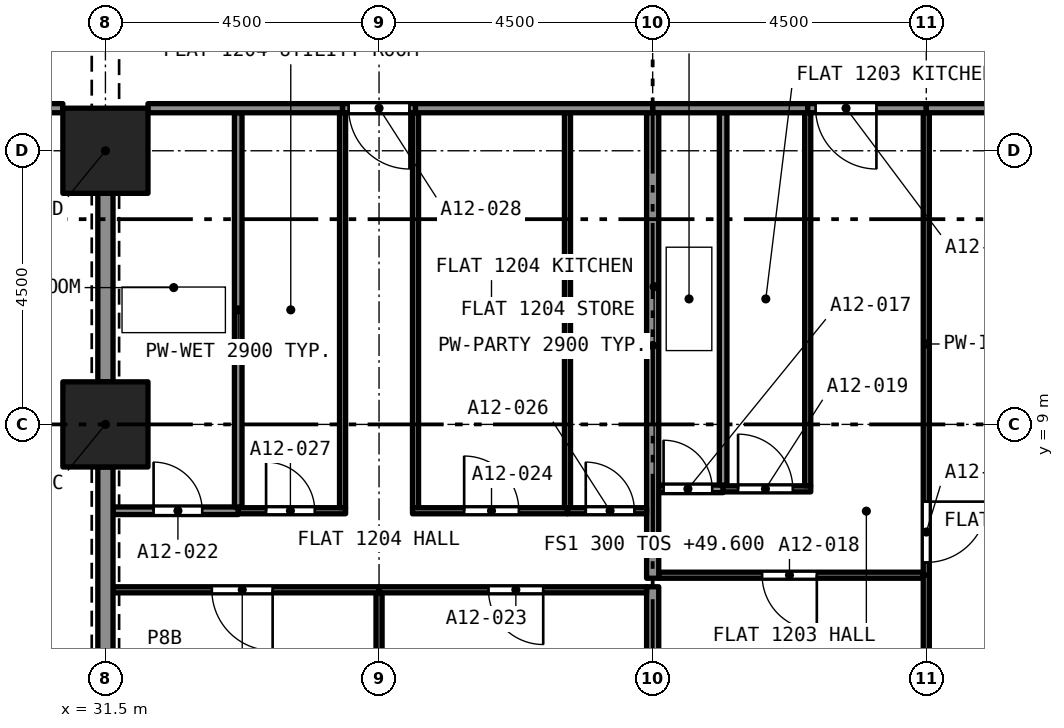
"""IFC4 building model, lengths in metres.
Left out: names, types, materials, properties, quantities, classifications, styles, units other than length and angle.
Written with IfcOpenShell. Run it as: python <this file> out.ifc"""

import sys

from ifc_helpers import new_model, si_unit, direction, frame, frame_2d, origin, origin_2d, place, context, subcontext, project, spatial, rectangle, extrude, element, fill, save


model = new_model("IFC4")
c1 = context("Model", 3, precision=1e-05, world=origin(), true_north=direction((0.0, 1.0)))
c2 = subcontext(c1, "Body", "Model", "MODEL_VIEW")
j1 = project(units=[si_unit("LENGTHUNIT", "METRE"), si_unit("PLANEANGLEUNIT", "RADIAN")], contexts=[c1])
p1 = place(None, origin())
s1 = spatial("IfcSite", under=j1, at=p1, CompositionType="ELEMENT")
p2 = place(p1, origin())
s2 = spatial("IfcBuilding", under=s1, at=p2, CompositionType="ELEMENT")
p3 = place(p2, frame((0.0, 0.0, 49.6)))
s3 = spatial("IfcBuildingStorey", under=s2, at=p3, CompositionType="ELEMENT", Elevation=49.6)
for number, where, z_axis, x_axis in (
    (1, (31.5, 9.0, 0.0), (0.0, 0.0, 1.0), (1.0, 0.0, 0.0)),
    (2, (31.5, 13.5, 0.0), (0.0, 0.0, 1.0), (1.0, 0.0, 0.0)),
):
    element("IfcColumn", number, at=place(p3, frame(where, z_axis=z_axis, x_axis=x_axis)), inside=s3, PredefinedType="COLUMN", context=c2, shape_type="SweptSolid", body=[
        extrude(rectangle(XDim=1.4, YDim=1.4, at=origin_2d()), origin(), (0.0, 0.0, 1.0), 3.2),
    ])
p4 = place(p3, frame((40.6, 7.94, 0.0), z_axis=(0.0, 0.0, 1.0), x_axis=(1.0, 0.0, 0.0)))
e3 = element("IfcWall", 3, at=p4, inside=s3, PredefinedType="PARTITIONING", context=c2, shape_type="SweptSolid", body=[
    extrude(rectangle(XDim=1.059, YDim=0.125, at=frame_2d((0.53, 0.0))), origin(), (0.0, 0.0, 1.0), 2.9),
])
p5 = place(p4, frame((0.08, 0.0, 0.0)))
e4 = element("IfcOpeningElement", 4, at=p5, cuts=e3, PredefinedType="OPENING", context=c2, shape_type="SweptSolid", body=[
    extrude(rectangle(XDim=0.8, YDim=2.1, at=frame_2d((0.4, 1.05))), frame((0.0, 0.073, 0.0), z_axis=(0.0, -1.0, 0.0), x_axis=(1.0, 0.0, 0.0)), (0.0, 0.0, 1.0), 0.145),
])
p6 = place(p3, frame((41.659, 8.002, 0.0), z_axis=(0.0, 0.0, 1.0), x_axis=(0.0, 1.0, 0.0)))
e5 = element("IfcWall", 5, at=p6, inside=s3, PredefinedType="PARTITIONING", context=c2, shape_type="SweptSolid", body=[
    extrude(rectangle(XDim=6.123, YDim=0.125, at=frame_2d((3.061, 0.0))), origin(), (0.0, 0.0, 1.0), 2.9),
])
p7 = place(p3, frame((40.5, 14.2, 0.0), z_axis=(0.0, 0.0, 1.0), x_axis=(1.0, 0.0, 0.0)))
e6 = element("IfcWall", 6, at=p7, inside=s3, PredefinedType="PARTITIONING", context=c2, shape_type="SweptSolid", body=[
    extrude(rectangle(XDim=2.55, YDim=0.15, at=frame_2d((1.275, 0.0))), origin(), (0.0, 0.0, 1.0), 2.9),
])
p8 = place(p3, frame((44.95, 6.52, 0.0), z_axis=(0.0, 0.0, 1.0), x_axis=(-1.0, 0.0, 0.0)))
e7 = element("IfcWall", 7, at=p8, inside=s3, PredefinedType="PARTITIONING", context=c2, shape_type="SweptSolid", body=[
    extrude(rectangle(XDim=4.35, YDim=0.1, at=frame_2d((2.175, 0.0))), origin(), (0.0, 0.0, 1.0), 2.9),
])
p9 = place(p8, frame((1.75, 0.0, 0.0)))
e8 = element("IfcOpeningElement", 8, at=p9, cuts=e7, PredefinedType="OPENING", context=c2, shape_type="SweptSolid", body=[
    extrude(rectangle(XDim=0.9, YDim=2.1, at=frame_2d((0.45, 1.05))), frame((0.0, 0.06, 0.0), z_axis=(0.0, -1.0, 0.0), x_axis=(1.0, 0.0, 0.0)), (0.0, 0.0, 1.0), 0.12),
])
p10 = place(p3, frame((45.0, 0.758, 0.0), z_axis=(0.0, 0.0, 1.0), x_axis=(0.0, 1.0, 0.0)))
e9 = element("IfcWall", 9, at=p10, inside=s3, PredefinedType="PARTITIONING", context=c2, shape_type="SweptSolid", body=[
    extrude(rectangle(XDim=5.762, YDim=0.1, at=frame_2d((2.881, 0.0))), origin(), (0.0, 0.0, 1.0), 2.9),
])
p11 = place(p3, frame((40.5, 0.7, 0.0), z_axis=(0.0, 0.0, 1.0), x_axis=(0.0, 1.0, 0.0)))
e10 = element("IfcWall", 10, at=p11, inside=s3, PredefinedType="PARTITIONING", context=c2, shape_type="SweptSolid", body=[
    extrude(rectangle(XDim=5.63, YDim=0.2, at=frame_2d((2.815, 0.0))), origin(), (0.0, 0.0, 1.0), 2.9),
])
p12 = place(p3, frame((41.659, 7.94, 0.0), z_axis=(0.0, 0.0, 1.0), x_axis=(1.0, 0.0, 0.0)))
e11 = element("IfcWall", 11, at=p12, inside=s3, PredefinedType="PARTITIONING", context=c2, shape_type="SweptSolid", body=[
    extrude(rectangle(XDim=1.441, YDim=0.1, at=frame_2d((0.72, 0.0))), origin(), (0.0, 0.0, 1.0), 2.9),
])
p13 = place(p12, frame((0.246, 0.0, 0.0)))
e12 = element("IfcOpeningElement", 12, at=p13, cuts=e11, PredefinedType="OPENING", context=c2, shape_type="SweptSolid", body=[
    extrude(rectangle(XDim=0.9, YDim=2.1, at=frame_2d((0.45, 1.05))), frame((0.0, 0.06, 0.0), z_axis=(0.0, -1.0, 0.0), x_axis=(1.0, 0.0, 0.0)), (0.0, 0.0, 1.0), 0.12),
])
p14 = place(p3, frame((43.05, 7.99, 0.0), z_axis=(0.0, 0.0, 1.0), x_axis=(0.0, 1.0, 0.0)))
e13 = element("IfcWall", 13, at=p14, inside=s3, PredefinedType="PARTITIONING", context=c2, shape_type="SweptSolid", body=[
    extrude(rectangle(XDim=6.135, YDim=0.1, at=frame_2d((3.067, 0.0))), origin(), (0.0, 0.0, 1.0), 2.9),
])
p15 = place(p3, frame((45.0, 14.125, 0.0), z_axis=(0.0, 0.0, 1.0), x_axis=(0.0, -1.0, 0.0)))
e14 = element("IfcWall", 14, at=p15, inside=s3, PredefinedType="PARTITIONING", context=c2, shape_type="SweptSolid", body=[
    extrude(rectangle(XDim=7.605, YDim=0.1, at=frame_2d((3.802, 0.0))), origin(), (0.0, 0.0, 1.0), 2.9),
])
p16 = place(p15, frame((6.395, 0.0, 0.0)))
e15 = element("IfcOpeningElement", 15, at=p16, cuts=e14, PredefinedType="OPENING", context=c2, shape_type="SweptSolid", body=[
    extrude(rectangle(XDim=1.0, YDim=2.1, at=frame_2d((0.5, 1.05))), frame((0.0, 0.06, 0.0), z_axis=(0.0, -1.0, 0.0), x_axis=(1.0, 0.0, 0.0)), (0.0, 0.0, 1.0), 0.12),
])
p17 = place(p3, frame((40.5, 6.47, 0.0), z_axis=(0.0, 0.0, 1.0), x_axis=(0.0, 1.0, 0.0)))
e16 = element("IfcWall", 16, at=p17, inside=s3, PredefinedType="PARTITIONING", context=c2, shape_type="SweptSolid", body=[
    extrude(rectangle(XDim=7.655, YDim=0.2, at=frame_2d((3.828, 0.0))), origin(), (0.0, 0.0, 1.0), 2.9),
])
p18 = place(p3, frame((45.0, 14.2, 0.0), z_axis=(0.0, 0.0, 1.0), x_axis=(-1.0, 0.0, 0.0)))
e17 = element("IfcWall", 17, at=p18, inside=s3, PredefinedType="PARTITIONING", context=c2, shape_type="SweptSolid", body=[
    extrude(rectangle(XDim=1.95, YDim=0.15, at=frame_2d((0.975, 0.0))), origin(), (0.0, 0.0, 1.0), 2.9),
])
p19 = place(p18, frame((0.82, 0.0, 0.0)))
e18 = element("IfcOpeningElement", 18, at=p19, cuts=e17, PredefinedType="OPENING", context=c2, shape_type="SweptSolid", body=[
    extrude(rectangle(XDim=1.0, YDim=2.1, at=frame_2d((0.5, 1.05))), frame((0.0, 0.085, 0.0), z_axis=(0.0, -1.0, 0.0), x_axis=(1.0, 0.0, 0.0)), (0.0, 0.0, 1.0), 0.17),
])
p20 = place(p3, frame((45.0, 14.2, 0.0), z_axis=(0.0, 0.0, 1.0), x_axis=(1.0, 0.0, 0.0)))
e19 = element("IfcWall", 19, at=p20, inside=s3, PredefinedType="PARTITIONING", context=c2, shape_type="SweptSolid", body=[
    extrude(rectangle(XDim=3.8, YDim=0.15, at=frame_2d((1.9, 0.0))), origin(), (0.0, 0.0, 1.0), 2.9),
])
p21 = place(p3, frame((31.625, 7.58, 0.0), z_axis=(0.0, 0.0, 1.0), x_axis=(1.0, 0.0, 0.0)))
e20 = element("IfcWall", 20, at=p21, inside=s3, PredefinedType="PARTITIONING", context=c2, shape_type="SweptSolid", body=[
    extrude(rectangle(XDim=2.059, YDim=0.125, at=frame_2d((1.03, 0.0))), origin(), (0.0, 0.0, 1.0), 2.9),
])
p22 = place(p21, frame((0.667, 0.0, 0.0)))
e21 = element("IfcOpeningElement", 21, at=p22, cuts=e20, PredefinedType="OPENING", context=c2, shape_type="SweptSolid", body=[
    extrude(rectangle(XDim=0.8, YDim=2.1, at=frame_2d((0.4, 1.05))), frame((0.0, 0.073, 0.0), z_axis=(0.0, -1.0, 0.0), x_axis=(1.0, 0.0, 0.0)), (0.0, 0.0, 1.0), 0.145),
])
p23 = place(p3, frame((33.684, 7.643, 0.0), z_axis=(0.0, 0.0, 1.0), x_axis=(0.0, 1.0, 0.0)))
e22 = element("IfcWall", 22, at=p23, inside=s3, PredefinedType="PARTITIONING", context=c2, shape_type="SweptSolid", body=[
    extrude(rectangle(XDim=6.482, YDim=0.125, at=frame_2d((3.241, 0.0))), origin(), (0.0, 0.0, 1.0), 2.9),
])
p24 = place(p3, frame((31.5, 9.7, 0.0), z_axis=(0.0, 0.0, 1.0), x_axis=(0.0, 1.0, 0.0)))
e23 = element("IfcWall", 23, at=p24, inside=s3, PredefinedType="PARTITIONING", context=c2, shape_type="SweptSolid", body=[
    extrude(rectangle(XDim=3.1, YDim=0.25, at=frame_2d((1.55, 0.0))), origin(), (0.0, 0.0, 1.0), 2.38),
])
p25 = place(p3, frame((32.2, 14.2, 0.0), z_axis=(0.0, 0.0, 1.0), x_axis=(1.0, 0.0, 0.0)))
e24 = element("IfcWall", 24, at=p25, inside=s3, PredefinedType="PARTITIONING", context=c2, shape_type="SweptSolid", body=[
    extrude(rectangle(XDim=3.2, YDim=0.15, at=frame_2d((1.6, 0.0))), origin(), (0.0, 0.0, 1.0), 2.9),
])
p26 = place(p3, frame((40.4, 6.28, 0.0), z_axis=(0.0, 0.0, 1.0), x_axis=(-1.0, 0.0, 0.0)))
e25 = element("IfcWall", 25, at=p26, inside=s3, PredefinedType="PARTITIONING", context=c2, shape_type="SweptSolid", body=[
    extrude(rectangle(XDim=4.4, YDim=0.1, at=frame_2d((2.2, 0.0))), origin(), (0.0, 0.0, 1.0), 2.9),
])
p27 = place(p26, frame((1.7, 0.0, 0.0)))
e26 = element("IfcOpeningElement", 26, at=p27, cuts=e25, PredefinedType="OPENING", context=c2, shape_type="SweptSolid", body=[
    extrude(rectangle(XDim=0.9, YDim=2.1, at=frame_2d((0.45, 1.05))), frame((0.0, 0.06, 0.0), z_axis=(0.0, -1.0, 0.0), x_axis=(1.0, 0.0, 0.0)), (0.0, 0.0, 1.0), 0.12),
])
p28 = place(p3, frame((36.0, 0.7, 0.0), z_axis=(0.0, 0.0, 1.0), x_axis=(0.0, 1.0, 0.0)))
e27 = element("IfcWall", 27, at=p28, inside=s3, PredefinedType="PARTITIONING", context=c2, shape_type="SweptSolid", body=[
    extrude(rectangle(XDim=5.53, YDim=0.1, at=frame_2d((2.765, 0.0))), origin(), (0.0, 0.0, 1.0), 2.9),
])
p29 = place(p3, frame((36.6, 7.63, 0.0), z_axis=(0.0, 0.0, 1.0), x_axis=(0.0, 1.0, 0.0)))
e28 = element("IfcWall", 28, at=p29, inside=s3, PredefinedType="PARTITIONING", context=c2, shape_type="SweptSolid", body=[
    extrude(rectangle(XDim=6.495, YDim=0.1, at=frame_2d((3.248, 0.0))), origin(), (0.0, 0.0, 1.0), 2.9),
])
p30 = place(p3, frame((36.55, 7.58, 0.0), z_axis=(0.0, 0.0, 1.0), x_axis=(1.0, 0.0, 0.0)))
e29 = element("IfcWall", 29, at=p30, inside=s3, PredefinedType="PARTITIONING", context=c2, shape_type="SweptSolid", body=[
    extrude(rectangle(XDim=2.549, YDim=0.1, at=frame_2d((1.275, 0.0))), origin(), (0.0, 0.0, 1.0), 2.9),
])
p31 = place(p30, frame((0.85, 0.0, 0.0)))
e30 = element("IfcOpeningElement", 30, at=p31, cuts=e29, PredefinedType="OPENING", context=c2, shape_type="SweptSolid", body=[
    extrude(rectangle(XDim=0.9, YDim=2.1, at=frame_2d((0.45, 1.05))), frame((0.0, 0.06, 0.0), z_axis=(0.0, -1.0, 0.0), x_axis=(1.0, 0.0, 0.0)), (0.0, 0.0, 1.0), 0.12),
])
p32 = place(p3, frame((36.0, 6.28, 0.0), z_axis=(0.0, 0.0, 1.0), x_axis=(-1.0, 0.0, 0.0)))
e31 = element("IfcWall", 31, at=p32, inside=s3, PredefinedType="PARTITIONING", context=c2, shape_type="SweptSolid", body=[
    extrude(rectangle(XDim=4.375, YDim=0.1, at=frame_2d((2.188, 0.0))), origin(), (0.0, 0.0, 1.0), 2.9),
])
p33 = place(p32, frame((1.75, 0.0, 0.0)))
e32 = element("IfcOpeningElement", 32, at=p33, cuts=e31, PredefinedType="OPENING", context=c2, shape_type="SweptSolid", body=[
    extrude(rectangle(XDim=1.0, YDim=2.1, at=frame_2d((0.5, 1.05))), frame((0.0, 0.06, 0.0), z_axis=(0.0, -1.0, 0.0), x_axis=(1.0, 0.0, 0.0)), (0.0, 0.0, 1.0), 0.12),
])
p34 = place(p3, frame((39.099, 7.58, 0.0), z_axis=(0.0, 0.0, 1.0), x_axis=(1.0, 0.0, 0.0)))
e33 = element("IfcWall", 33, at=p34, inside=s3, PredefinedType="PARTITIONING", context=c2, shape_type="SweptSolid", body=[
    extrude(rectangle(XDim=1.301, YDim=0.1, at=frame_2d((0.65, 0.0))), origin(), (0.0, 0.0, 1.0), 2.9),
])
p35 = place(p34, frame((0.3, 0.0, 0.0)))
e34 = element("IfcOpeningElement", 34, at=p35, cuts=e33, PredefinedType="OPENING", context=c2, shape_type="SweptSolid", body=[
    extrude(rectangle(XDim=0.8, YDim=2.1, at=frame_2d((0.4, 1.05))), frame((0.0, 0.06, 0.0), z_axis=(0.0, -1.0, 0.0), x_axis=(1.0, 0.0, 0.0)), (0.0, 0.0, 1.0), 0.12),
])
p36 = place(p3, frame((33.684, 7.58, 0.0), z_axis=(0.0, 0.0, 1.0), x_axis=(1.0, 0.0, 0.0)))
e35 = element("IfcWall", 35, at=p36, inside=s3, PredefinedType="PARTITIONING", context=c2, shape_type="SweptSolid", body=[
    extrude(rectangle(XDim=1.766, YDim=0.1, at=frame_2d((0.883, 0.0))), origin(), (0.0, 0.0, 1.0), 2.9),
])
p37 = place(p36, frame((0.458, 0.0, 0.0)))
e36 = element("IfcOpeningElement", 36, at=p37, cuts=e35, PredefinedType="OPENING", context=c2, shape_type="SweptSolid", body=[
    extrude(rectangle(XDim=0.8, YDim=2.1, at=frame_2d((0.4, 1.05))), frame((0.0, 0.06, 0.0), z_axis=(0.0, -1.0, 0.0), x_axis=(1.0, 0.0, 0.0)), (0.0, 0.0, 1.0), 0.12),
])
p38 = place(p3, frame((35.4, 7.63, 0.0), z_axis=(0.0, 0.0, 1.0), x_axis=(0.0, 1.0, 0.0)))
e37 = element("IfcWall", 37, at=p38, inside=s3, PredefinedType="PARTITIONING", context=c2, shape_type="SweptSolid", body=[
    extrude(rectangle(XDim=6.495, YDim=0.1, at=frame_2d((3.248, 0.0))), origin(), (0.0, 0.0, 1.0), 2.9),
])
p39 = place(p3, frame((36.6, 14.2, 0.0), z_axis=(0.0, 0.0, 1.0), x_axis=(-1.0, 0.0, 0.0)))
e38 = element("IfcWall", 38, at=p39, inside=s3, PredefinedType="PARTITIONING", context=c2, shape_type="SweptSolid", body=[
    extrude(rectangle(XDim=1.2, YDim=0.15, at=frame_2d((0.6, 0.0))), origin(), (0.0, 0.0, 1.0), 2.9),
])
p40 = place(p39, frame((0.1, 0.0, 0.0)))
e39 = element("IfcOpeningElement", 39, at=p40, cuts=e38, PredefinedType="OPENING", context=c2, shape_type="SweptSolid", body=[
    extrude(rectangle(XDim=1.0, YDim=2.1, at=frame_2d((0.5, 1.05))), frame((0.0, 0.085, 0.0), z_axis=(0.0, -1.0, 0.0), x_axis=(1.0, 0.0, 0.0)), (0.0, 0.0, 1.0), 0.17),
])
p41 = place(p3, frame((39.099, 7.63, 0.0), z_axis=(0.0, 0.0, 1.0), x_axis=(0.0, 1.0, 0.0)))
e40 = element("IfcWall", 40, at=p41, inside=s3, PredefinedType="PARTITIONING", context=c2, shape_type="SweptSolid", body=[
    extrude(rectangle(XDim=6.495, YDim=0.1, at=frame_2d((3.248, 0.0))), origin(), (0.0, 0.0, 1.0), 2.9),
])
p42 = place(p3, frame((36.6, 14.2, 0.0), z_axis=(0.0, 0.0, 1.0), x_axis=(1.0, 0.0, 0.0)))
e41 = element("IfcWall", 41, at=p42, inside=s3, PredefinedType="PARTITIONING", context=c2, shape_type="SweptSolid", body=[
    extrude(rectangle(XDim=3.9, YDim=0.15, at=frame_2d((1.95, 0.0))), origin(), (0.0, 0.0, 1.0), 2.9),
])
p43 = place(p3, frame((31.5, 5.2, 0.0), z_axis=(0.0, 0.0, 1.0), x_axis=(0.0, 1.0, 0.0)))
e42 = element("IfcWall", 42, at=p43, inside=s3, PredefinedType="PARTITIONING", context=c2, shape_type="SweptSolid", body=[
    extrude(rectangle(XDim=3.1, YDim=0.25, at=frame_2d((1.55, 0.0))), origin(), (0.0, 0.0, 1.0), 2.38),
])
p44 = place(p3, frame((30.8, 14.2, 0.0), z_axis=(0.0, 0.0, 1.0), x_axis=(-1.0, 0.0, 0.0)))
e43 = element("IfcWall", 43, at=p44, inside=s3, PredefinedType="PARTITIONING", context=c2, shape_type="SweptSolid", body=[
    extrude(rectangle(XDim=3.8, YDim=0.15, at=frame_2d((1.9, 0.0))), origin(), (0.0, 0.0, 1.0), 2.75),
])
p45 = place(p44, frame((1.05, 0.0, 0.0)))
e44 = element("IfcOpeningElement", 44, at=p45, cuts=e43, PredefinedType="OPENING", context=c2, shape_type="SweptSolid", body=[
    extrude(rectangle(XDim=1.0, YDim=2.1, at=frame_2d((0.5, 1.05))), frame((0.0, 0.085, 0.0), z_axis=(0.0, -1.0, 0.0), x_axis=(1.0, 0.0, 0.0)), (0.0, 0.0, 1.0), 0.17),
])
p46 = place(p5, origin())
e45 = element("IfcDoor", 45, at=p46, inside=s3, OperationType="SINGLE_SWING_LEFT", PredefinedType="DOOR", context=c2, shape_type="SweptSolid", body=[
    extrude(rectangle(XDim=0.8, YDim=2.1, at=frame_2d((0.4, 1.05))), frame((0.0, 0.025, 0.0), z_axis=(0.0, -1.0, 0.0), x_axis=(1.0, 0.0, 0.0)), (0.0, 0.0, 1.0), 0.05),
])
fill(e4, e45)
p47 = place(p9, origin())
e46 = element("IfcDoor", 46, at=p47, inside=s3, OperationType="SINGLE_SWING_RIGHT", PredefinedType="DOOR", context=c2, shape_type="SweptSolid", body=[
    extrude(rectangle(XDim=0.9, YDim=2.1, at=frame_2d((0.45, 1.05))), frame((0.0, 0.025, 0.0), z_axis=(0.0, -1.0, 0.0), x_axis=(1.0, 0.0, 0.0)), (0.0, 0.0, 1.0), 0.05),
])
fill(e8, e46)
p48 = place(p13, origin())
e47 = element("IfcDoor", 47, at=p48, inside=s3, OperationType="SINGLE_SWING_LEFT", PredefinedType="DOOR", context=c2, shape_type="SweptSolid", body=[
    extrude(rectangle(XDim=0.9, YDim=2.1, at=frame_2d((0.45, 1.05))), frame((0.0, 0.025, 0.0), z_axis=(0.0, -1.0, 0.0), x_axis=(1.0, 0.0, 0.0)), (0.0, 0.0, 1.0), 0.05),
])
fill(e12, e47)
p49 = place(p16, origin())
e48 = element("IfcDoor", 48, at=p49, inside=s3, OperationType="SINGLE_SWING_RIGHT", PredefinedType="DOOR", context=c2, shape_type="SweptSolid", body=[
    extrude(rectangle(XDim=1.0, YDim=2.1, at=frame_2d((0.5, 1.05))), frame((0.0, 0.025, 0.0), z_axis=(0.0, -1.0, 0.0), x_axis=(1.0, 0.0, 0.0)), (0.0, 0.0, 1.0), 0.05),
])
fill(e15, e48)
p50 = place(p19, origin())
e49 = element("IfcDoor", 49, at=p50, inside=s3, OperationType="SINGLE_SWING_RIGHT", PredefinedType="DOOR", context=c2, shape_type="SweptSolid", body=[
    extrude(rectangle(XDim=1.0, YDim=2.1, at=frame_2d((0.5, 1.05))), frame((0.0, 0.025, 0.0), z_axis=(0.0, -1.0, 0.0), x_axis=(1.0, 0.0, 0.0)), (0.0, 0.0, 1.0), 0.05),
])
fill(e18, e49)
p51 = place(p22, origin())
e50 = element("IfcDoor", 50, at=p51, inside=s3, OperationType="SINGLE_SWING_RIGHT", PredefinedType="DOOR", context=c2, shape_type="SweptSolid", body=[
    extrude(rectangle(XDim=0.8, YDim=2.1, at=frame_2d((0.4, 1.05))), frame((0.0, 0.025, 0.0), z_axis=(0.0, -1.0, 0.0), x_axis=(1.0, 0.0, 0.0)), (0.0, 0.0, 1.0), 0.05),
])
fill(e21, e50)
p52 = place(p27, origin())
e51 = element("IfcDoor", 51, at=p52, inside=s3, OperationType="SINGLE_SWING_LEFT", PredefinedType="DOOR", context=c2, shape_type="SweptSolid", body=[
    extrude(rectangle(XDim=0.9, YDim=2.1, at=frame_2d((0.45, 1.05))), frame((0.0, 0.025, 0.0), z_axis=(0.0, -1.0, 0.0), x_axis=(1.0, 0.0, 0.0)), (0.0, 0.0, 1.0), 0.05),
])
fill(e26, e51)
p53 = place(p31, origin())
e52 = element("IfcDoor", 52, at=p53, inside=s3, OperationType="SINGLE_SWING_RIGHT", PredefinedType="DOOR", context=c2, shape_type="SweptSolid", body=[
    extrude(rectangle(XDim=0.9, YDim=2.1, at=frame_2d((0.45, 1.05))), frame((0.0, 0.025, 0.0), z_axis=(0.0, -1.0, 0.0), x_axis=(1.0, 0.0, 0.0)), (0.0, 0.0, 1.0), 0.05),
])
fill(e30, e52)
p54 = place(p33, origin())
e53 = element("IfcDoor", 53, at=p54, inside=s3, OperationType="SINGLE_SWING_RIGHT", PredefinedType="DOOR", context=c2, shape_type="SweptSolid", body=[
    extrude(rectangle(XDim=1.0, YDim=2.1, at=frame_2d((0.5, 1.05))), frame((0.0, 0.025, 0.0), z_axis=(0.0, -1.0, 0.0), x_axis=(1.0, 0.0, 0.0)), (0.0, 0.0, 1.0), 0.05),
])
fill(e32, e53)
p55 = place(p35, origin())
e54 = element("IfcDoor", 54, at=p55, inside=s3, OperationType="SINGLE_SWING_RIGHT", PredefinedType="DOOR", context=c2, shape_type="SweptSolid", body=[
    extrude(rectangle(XDim=0.8, YDim=2.1, at=frame_2d((0.4, 1.05))), frame((0.0, 0.025, 0.0), z_axis=(0.0, -1.0, 0.0), x_axis=(1.0, 0.0, 0.0)), (0.0, 0.0, 1.0), 0.05),
])
fill(e34, e54)
p56 = place(p37, origin())
e55 = element("IfcDoor", 55, at=p56, inside=s3, OperationType="SINGLE_SWING_LEFT", PredefinedType="DOOR", context=c2, shape_type="SweptSolid", body=[
    extrude(rectangle(XDim=0.8, YDim=2.1, at=frame_2d((0.4, 1.05))), frame((0.0, 0.025, 0.0), z_axis=(0.0, -1.0, 0.0), x_axis=(1.0, 0.0, 0.0)), (0.0, 0.0, 1.0), 0.05),
])
fill(e36, e55)
p57 = place(p40, origin())
e56 = element("IfcDoor", 56, at=p57, inside=s3, OperationType="SINGLE_SWING_RIGHT", PredefinedType="DOOR", context=c2, shape_type="SweptSolid", body=[
    extrude(rectangle(XDim=1.0, YDim=2.1, at=frame_2d((0.5, 1.05))), frame((0.0, 0.025, 0.0), z_axis=(0.0, -1.0, 0.0), x_axis=(1.0, 0.0, 0.0)), (0.0, 0.0, 1.0), 0.05),
])
fill(e39, e56)
save(model, sys.argv[1])
